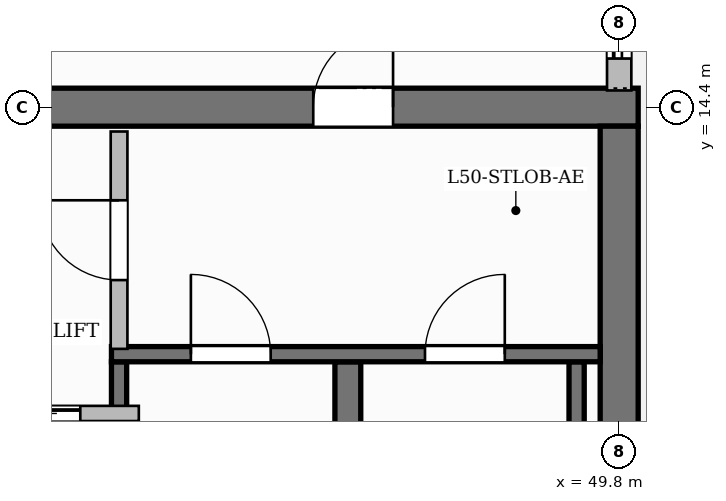
"""IFC4 building model, lengths in metres.
Left out: names, types, materials, properties, quantities, classifications, styles, units other than length and angle.
Written with IfcOpenShell. Run it as: python <this file> out.ifc"""

import sys

from ifc_helpers import new_model, si_unit, direction, frame, frame_2d, origin, place, context, subcontext, project, spatial, rectangle, extrude, source, transform, mapped, element, fill, save


model = new_model("IFC4")
c1 = context("Model", 3, precision=1e-05, world=origin(), true_north=direction((0.0, 1.0)))
c2 = subcontext(c1, "Body", "Model", "MODEL_VIEW")
j1 = project(units=[si_unit("LENGTHUNIT", "METRE"), si_unit("PLANEANGLEUNIT", "RADIAN")], contexts=[c1])
p1 = place(None, origin())
s1 = spatial("IfcSite", under=j1, at=p1, CompositionType="ELEMENT")
p2 = place(p1, origin())
s2 = spatial("IfcBuilding", under=s1, at=p2, CompositionType="ELEMENT")
p3 = place(p2, frame((0.0, 0.0, 201.9)))
s3 = spatial("IfcBuildingStorey", under=s2, at=p3, CompositionType="ELEMENT", Elevation=201.9)
p4 = place(p3, frame((34.55, 14.4, 0.0), z_axis=(0.0, 0.0, 1.0), x_axis=(1.0, 0.0, 0.0)))
e1 = element("IfcWall", 1, at=p4, inside=s3, PredefinedType="SHEAR", context=c2, shape_type="SweptSolid", body=[
    extrude(rectangle(XDim=15.5, YDim=0.5, at=frame_2d((7.75, 0.0))), origin(), (0.0, 0.0, 1.0), 3.85),
])
p5 = place(p4, frame((5.38, 0.0, 0.0)))
e2 = element("IfcOpeningElement", 2, at=p5, cuts=e1, PredefinedType="OPENING", context=c2, shape_type="SweptSolid", body=[
    extrude(rectangle(XDim=1.5, YDim=2.2, at=frame_2d((0.75, 1.1))), frame((0.0, 0.26, 0.0), z_axis=(0.0, -1.0, 0.0), x_axis=(1.0, 0.0, 0.0)), (0.0, 0.0, 1.0), 0.52),
])
p6 = place(p4, frame((1.595, 0.0, 0.0)))
e3 = element("IfcOpeningElement", 3, at=p6, cuts=e1, PredefinedType="OPENING", context=c2, shape_type="SweptSolid", body=[
    extrude(rectangle(XDim=1.05, YDim=2.15, at=frame_2d((0.525, 1.075))), frame((0.0, 0.26, 0.0), z_axis=(0.0, -1.0, 0.0), x_axis=(1.0, 0.0, 0.0)), (0.0, 0.0, 1.0), 0.52),
])
p7 = place(p4, frame((11.225, 0.0, 0.0)))
e4 = element("IfcOpeningElement", 4, at=p7, cuts=e1, PredefinedType="OPENING", context=c2, shape_type="SweptSolid", body=[
    extrude(rectangle(XDim=1.05, YDim=2.15, at=frame_2d((0.525, 1.075))), frame((0.0, 0.26, 0.0), z_axis=(0.0, -1.0, 0.0), x_axis=(1.0, 0.0, 0.0)), (0.0, 0.0, 1.0), 0.52),
])
p8 = place(p3, frame((49.8, 3.85, 0.0), z_axis=(0.0, 0.0, 1.0), x_axis=(0.0, 1.0, 0.0)))
e5 = element("IfcWall", 5, at=p8, inside=s3, PredefinedType="SHEAR", context=c2, shape_type="SweptSolid", body=[
    extrude(rectangle(XDim=10.3, YDim=0.5, at=frame_2d((5.15, 0.0))), origin(), (0.0, 0.0, 1.0), 3.85),
])
p9 = place(p3, frame((43.22, 4.1, 0.0), z_axis=(0.0, 0.0, 1.0), x_axis=(0.0, 1.0, 0.0)))
e6 = element("IfcWall", 6, at=p9, inside=s3, PredefinedType="SHEAR", context=c2, shape_type="SweptSolid", body=[
    extrude(rectangle(XDim=6.95, YDim=0.2, at=frame_2d((3.475, 0.0))), origin(), (0.0, 0.0, 1.0), 3.85),
])
p10 = place(p3, frame((46.23, 4.1, 0.0), z_axis=(0.0, 0.0, 1.0), x_axis=(0.0, 1.0, 0.0)))
e7 = element("IfcWall", 7, at=p10, inside=s3, PredefinedType="SHEAR", context=c2, shape_type="SweptSolid", body=[
    extrude(rectangle(XDim=6.95, YDim=0.34, at=frame_2d((3.475, 0.0))), origin(), (0.0, 0.0, 1.0), 3.85),
])
p11 = place(p3, frame((49.24, 4.1, 0.0), z_axis=(0.0, 0.0, 1.0), x_axis=(0.0, 1.0, 0.0)))
e8 = element("IfcWall", 8, at=p11, inside=s3, PredefinedType="SHEAR", context=c2, shape_type="SweptSolid", body=[
    extrude(rectangle(XDim=6.95, YDim=0.2, at=frame_2d((3.475, 0.0))), origin(), (0.0, 0.0, 1.0), 3.85),
])
p12 = place(p3, frame((43.12, 11.15, 0.0), z_axis=(0.0, 0.0, 1.0), x_axis=(1.0, 0.0, 0.0)))
e9 = element("IfcWall", 9, at=p12, inside=s3, PredefinedType="SHEAR", context=c2, shape_type="SweptSolid", body=[
    extrude(rectangle(XDim=6.43, YDim=0.2, at=frame_2d((3.215, 0.0))), origin(), (0.0, 0.0, 1.0), 3.85),
])
p13 = place(p12, frame((1.045, 0.0, 0.0)))
e10 = element("IfcOpeningElement", 10, at=p13, cuts=e9, PredefinedType="OPENING", context=c2, shape_type="SweptSolid", body=[
    extrude(rectangle(XDim=1.05, YDim=2.2, at=frame_2d((0.525, 1.1))), frame((0.0, 0.11, 0.0), z_axis=(0.0, -1.0, 0.0), x_axis=(1.0, 0.0, 0.0)), (0.0, 0.0, 1.0), 0.22),
])
p14 = place(p12, frame((4.125, 0.0, 0.0)))
e11 = element("IfcOpeningElement", 11, at=p14, cuts=e9, PredefinedType="OPENING", context=c2, shape_type="SweptSolid", body=[
    extrude(rectangle(XDim=1.05, YDim=2.2, at=frame_2d((0.525, 1.1))), frame((0.0, 0.11, 0.0), z_axis=(0.0, -1.0, 0.0), x_axis=(1.0, 0.0, 0.0)), (0.0, 0.0, 1.0), 0.22),
])
p15 = place(p3, frame((43.22, 11.22, 0.0), z_axis=(0.0, 0.0, 1.0), x_axis=(0.0, 1.0, 0.0)))
e12 = element("IfcWall", 12, at=p15, inside=s3, PredefinedType="PARTITIONING", context=c2, shape_type="SweptSolid", body=[
    extrude(rectangle(XDim=2.86, YDim=0.22, at=frame_2d((1.43, 0.0))), origin(), (0.0, 0.0, 1.0), 3.6),
])
p16 = place(p15, frame((0.905, 0.0, 0.0)))
e13 = element("IfcOpeningElement", 13, at=p16, cuts=e12, PredefinedType="OPENING", context=c2, shape_type="SweptSolid", body=[
    extrude(rectangle(XDim=1.05, YDim=2.15, at=frame_2d((0.525, 1.075))), frame((0.0, 0.12, 0.0), z_axis=(0.0, -1.0, 0.0), x_axis=(1.0, 0.0, 0.0)), (0.0, 0.0, 1.0), 0.24),
])
p17 = place(p3, frame((40.84, 10.37, 0.0), z_axis=(0.0, 0.0, 1.0), x_axis=(1.0, 0.0, 0.0)))
e14 = element("IfcWall", 14, at=p17, inside=s3, PredefinedType="PARTITIONING", context=c2, shape_type="SweptSolid", body=[
    extrude(rectangle(XDim=2.64, YDim=0.2, at=frame_2d((1.32, 0.0))), origin(), (0.0, 0.0, 1.0), 3.6),
])
p18 = place(p17, frame((0.77, 0.0, 0.0)))
e15 = element("IfcOpeningElement", 15, at=p18, cuts=e14, PredefinedType="OPENING", context=c2, shape_type="SweptSolid", body=[
    extrude(rectangle(XDim=1.1, YDim=2.2, at=frame_2d((0.55, 1.1))), frame((0.0, 0.11, 0.0), z_axis=(0.0, -1.0, 0.0), x_axis=(1.0, 0.0, 0.0)), (0.0, 0.0, 1.0), 0.22),
])
p19 = place(p3, frame((49.8, 14.62, 0.0), z_axis=(0.0, 0.0, 1.0), x_axis=(0.0, 1.0, 0.0)))
e16 = element("IfcWall", 16, at=p19, inside=s3, PredefinedType="SOLIDWALL", context=c2, shape_type="SweptSolid", body=[
    extrude(rectangle(XDim=6.93, YDim=0.32, at=frame_2d((3.465, 0.0))), origin(), (0.0, 0.0, 1.0), 3.085),
])
p20 = place(p19, frame((0.42, 0.0, 0.0)))
e17 = element("IfcOpeningElement", 17, at=p20, cuts=e16, PredefinedType="OPENING", context=c2, shape_type="SweptSolid", body=[
    extrude(rectangle(XDim=1.2, YDim=2.2, at=frame_2d((0.6, 1.1))), frame((0.0, 0.17, 0.0), z_axis=(0.0, -1.0, 0.0), x_axis=(1.0, 0.0, 0.0)), (0.0, 0.0, 1.0), 0.34),
])
p21 = place(p19, frame((3.384, 0.0, 0.8)))
e18 = element("IfcOpeningElement", 18, at=p21, cuts=e16, PredefinedType="OPENING", context=c2, shape_type="SweptSolid", body=[
    extrude(rectangle(XDim=1.8, YDim=1.85, at=frame_2d((0.9, 0.925))), frame((0.0, 0.17, 0.0), z_axis=(0.0, -1.0, 0.0), x_axis=(1.0, 0.0, 0.0)), (0.0, 0.0, 1.0), 0.34),
])
m1 = source(origin(), c2, "Body", "SweptSolid", [
    extrude(rectangle(XDim=1.05, YDim=2.2, at=frame_2d((0.525, 1.1))), frame((0.0, 0.025, 0.0), z_axis=(0.0, -1.0, 0.0), x_axis=(1.0, 0.0, 0.0)), (0.0, 0.0, 1.0), 0.05),
])
p22 = place(p13, origin())
e19 = element("IfcDoor", 19, at=p22, inside=s3, OperationType="SINGLE_SWING_LEFT", PredefinedType="DOOR", context=c2, shape_type="MappedRepresentation", body=[
    mapped(m1, transform((0.0, 0.0, 0.0), scale=1.0)),
])
fill(e10, e19)
p23 = place(p14, origin())
e20 = element("IfcDoor", 20, at=p23, inside=s3, OperationType="SINGLE_SWING_RIGHT", PredefinedType="DOOR", context=c2, shape_type="MappedRepresentation", body=[
    mapped(m1, transform((0.0, 0.0, 0.0), scale=1.0)),
])
fill(e11, e20)
m2 = source(origin(), c2, "Body", "SweptSolid", [
    extrude(rectangle(XDim=1.05, YDim=2.15, at=frame_2d((0.525, 1.075))), frame((0.0, 0.025, 0.0), z_axis=(0.0, -1.0, 0.0), x_axis=(1.0, 0.0, 0.0)), (0.0, 0.0, 1.0), 0.05),
])
p24 = place(p16, origin())
e21 = element("IfcDoor", 21, at=p24, inside=s3, OperationType="SINGLE_SWING_RIGHT", PredefinedType="DOOR", context=c2, shape_type="MappedRepresentation", body=[
    mapped(m2, transform((0.0, 0.0, 0.0), scale=1.0)),
])
fill(e13, e21)
p25 = place(p7, origin())
e22 = element("IfcDoor", 22, at=p25, inside=s3, OperationType="SINGLE_SWING_RIGHT", PredefinedType="DOOR", context=c2, shape_type="MappedRepresentation", body=[
    mapped(m2, transform((0.0, 0.0, 0.0), scale=1.0)),
])
fill(e4, e22)
m3 = source(origin(), c2, "Body", "SweptSolid", [
    extrude(rectangle(XDim=1.1, YDim=2.2, at=frame_2d((0.55, 1.1))), frame((0.0, 0.025, 0.0), z_axis=(0.0, -1.0, 0.0), x_axis=(1.0, 0.0, 0.0)), (0.0, 0.0, 1.0), 0.05),
])
p26 = place(p18, origin())
e23 = element("IfcDoor", 23, at=p26, inside=s3, OperationType="SLIDING_TO_LEFT", PredefinedType="DOOR", context=c2, shape_type="MappedRepresentation", body=[
    mapped(m3, transform((0.0, 0.0, 0.0), scale=1.0)),
])
fill(e15, e23)
m4 = source(origin(), c2, "Body", "SweptSolid", [
    extrude(rectangle(XDim=1.2, YDim=2.2, at=frame_2d((0.6, 1.1))), frame((0.0, 0.025, 0.0), z_axis=(0.0, -1.0, 0.0), x_axis=(1.0, 0.0, 0.0)), (0.0, 0.0, 1.0), 0.05),
])
p27 = place(p20, origin())
e24 = element("IfcDoor", 24, at=p27, inside=s3, OperationType="SLIDING_TO_LEFT", PredefinedType="DOOR", context=c2, shape_type="MappedRepresentation", body=[
    mapped(m4, transform((0.0, 0.0, 0.0), scale=1.0)),
])
fill(e17, e24)
save(model, sys.argv[1])
